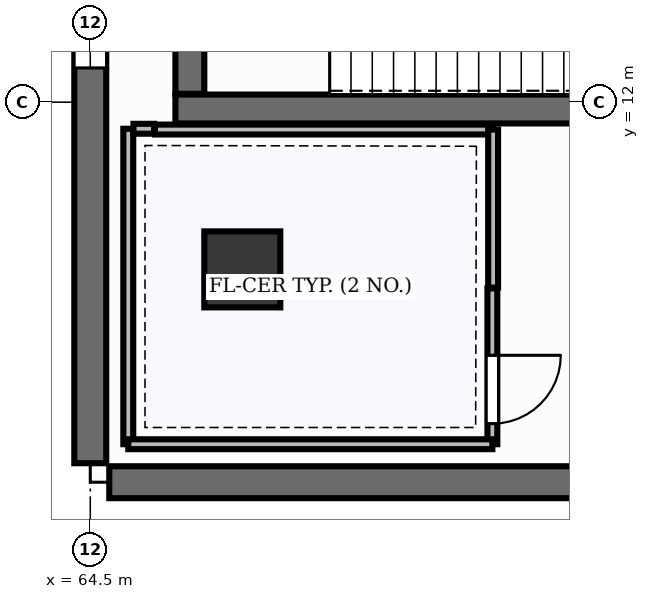
"""IFC4 building model, lengths in metres.
Left out: names, types, materials, properties, quantities, classifications, styles, units other than length and angle.
Written with IfcOpenShell. Run it as: python <this file> out.ifc"""

import sys

from ifc_helpers import new_model, si_unit, direction, frame, frame_2d, origin, origin_2d, place, context, subcontext, project, spatial, rectangle, extrude, element, fill, save


model = new_model("IFC4")
c1 = context("Model", 3, precision=1e-05, world=origin(), true_north=direction((0.0, 1.0)))
c2 = subcontext(c1, "Body", "Model", "MODEL_VIEW")
j1 = project(units=[si_unit("LENGTHUNIT", "METRE"), si_unit("PLANEANGLEUNIT", "RADIAN")], contexts=[c1])
p1 = place(None, origin())
s1 = spatial("IfcSite", under=j1, at=p1, CompositionType="ELEMENT")
p2 = place(p1, origin())
s2 = spatial("IfcBuilding", under=s1, at=p2, CompositionType="ELEMENT")
p3 = place(p2, frame((0.0, 0.0, 10.2)))
s3 = spatial("IfcBuildingStorey", under=s2, at=p3, CompositionType="ELEMENT", Elevation=10.2)
p4 = place(p3, frame((66.5, 9.8, 0.0), z_axis=(0.0, 0.0, 1.0), x_axis=(1.0, 0.0, 0.0)))
e1 = element("IfcColumn", 1, at=p4, inside=s3, PredefinedType="COLUMN", context=c2, shape_type="SweptSolid", body=[
    extrude(rectangle(XDim=1.0, YDim=1.0, at=origin_2d()), origin(), (0.0, 0.0, 1.0), 4.5),
])
p5 = place(p3, frame((64.5, 7.25, 0.0), z_axis=(0.0, 0.0, 1.0), x_axis=(0.0, 1.0, 0.0)))
e2 = element("IfcWall", 2, at=p5, inside=s3, PredefinedType="SHEAR", context=c2, shape_type="SweptSolid", body=[
    extrude(rectangle(XDim=39.5, YDim=0.42, at=frame_2d((19.75, 0.0))), origin(), (0.0, 0.0, 1.0), 4.5),
])
p6 = place(p5, frame((5.2, 0.0, 0.9)))
e3 = element("IfcOpeningElement", 3, at=p6, cuts=e2, PredefinedType="OPENING", context=c2, shape_type="SweptSolid", body=[
    extrude(rectangle(XDim=1.2, YDim=2.7, at=frame_2d((0.6, 1.35))), frame((0.0, 0.225, 0.0), z_axis=(0.0, -1.0, 0.0), x_axis=(1.0, 0.0, 0.0)), (0.0, 0.0, 1.0), 0.45),
])
p7 = place(p5, frame((12.2, 0.0, 0.9)))
e4 = element("IfcOpeningElement", 4, at=p7, cuts=e2, PredefinedType="OPENING", context=c2, shape_type="SweptSolid", body=[
    extrude(rectangle(XDim=1.2, YDim=2.7, at=frame_2d((0.6, 1.35))), frame((0.0, 0.225, 0.0), z_axis=(0.0, -1.0, 0.0), x_axis=(1.0, 0.0, 0.0)), (0.0, 0.0, 1.0), 0.45),
])
p8 = place(p5, frame((25.0, 0.0, 0.9)))
e5 = element("IfcOpeningElement", 5, at=p8, cuts=e2, PredefinedType="OPENING", context=c2, shape_type="SweptSolid", body=[
    extrude(rectangle(XDim=1.2, YDim=2.7, at=frame_2d((0.6, 1.35))), frame((0.0, 0.225, 0.0), z_axis=(0.0, -1.0, 0.0), x_axis=(1.0, 0.0, 0.0)), (0.0, 0.0, 1.0), 0.45),
])
p9 = place(p5, frame((31.8, 0.0, 0.9)))
e6 = element("IfcOpeningElement", 6, at=p9, cuts=e2, PredefinedType="OPENING", context=c2, shape_type="SweptSolid", body=[
    extrude(rectangle(XDim=1.2, YDim=2.7, at=frame_2d((0.6, 1.35))), frame((0.0, 0.225, 0.0), z_axis=(0.0, -1.0, 0.0), x_axis=(1.0, 0.0, 0.0)), (0.0, 0.0, 1.0), 0.45),
])
p10 = place(p3, frame((94.25, 7.0, 0.0), z_axis=(0.0, 0.0, 1.0), x_axis=(-1.0, 0.0, 0.0)))
e7 = element("IfcWall", 7, at=p10, inside=s3, PredefinedType="SHEAR", context=c2, shape_type="SweptSolid", body=[
    extrude(rectangle(XDim=29.5, YDim=0.42, at=frame_2d((14.75, 0.0))), origin(), (0.0, 0.0, 1.0), 4.5),
])
p11 = place(p3, frame((65.62, 11.91, 0.0), z_axis=(0.0, 0.0, 1.0), x_axis=(1.0, 0.0, 0.0)))
e8 = element("IfcWall", 8, at=p11, inside=s3, PredefinedType="SHEAR", context=c2, shape_type="SweptSolid", body=[
    extrude(rectangle(XDim=8.61, YDim=0.38, at=frame_2d((4.305, 0.0))), origin(), (0.0, 0.0, 1.0), 4.5),
])
p12 = place(p3, frame((65.81, 12.11, 0.0), z_axis=(0.0, 0.0, 1.0), x_axis=(0.0, 1.0, 0.0)))
e9 = element("IfcWall", 9, at=p12, inside=s3, PredefinedType="SHEAR", context=c2, shape_type="SweptSolid", body=[
    extrude(rectangle(XDim=3.48, YDim=0.38, at=frame_2d((1.74, 0.0))), origin(), (0.0, 0.0, 1.0), 4.5),
])
p13 = place(p3, frame((69.79, 9.55, 0.0), z_axis=(0.0, 0.0, 1.0), x_axis=(0.0, -1.0, 0.0)))
e10 = element("IfcWall", 10, at=p13, inside=s3, PredefinedType="PARTITIONING", context=c2, shape_type="SweptSolid", body=[
    extrude(rectangle(XDim=2.05, YDim=0.13, at=frame_2d((1.025, 0.0))), origin(), (0.0, 0.0, 1.0), 3.46),
])
p14 = place(p13, frame((0.88, 0.0, 0.0)))
e11 = element("IfcOpeningElement", 11, at=p14, cuts=e10, PredefinedType="OPENING", context=c2, shape_type="SweptSolid", body=[
    extrude(rectangle(XDim=0.9, YDim=2.15, at=frame_2d((0.45, 1.075))), frame((0.0, 0.08, 0.0), z_axis=(0.0, -1.0, 0.0), x_axis=(1.0, 0.0, 0.0)), (0.0, 0.0, 1.0), 0.16),
])
p15 = place(p3, frame((65.0, 7.5, 0.0), z_axis=(0.0, 0.0, 1.0), x_axis=(0.0, 1.0, 0.0)))
e12 = element("IfcWall", 12, at=p15, inside=s3, PredefinedType="PARTITIONING", context=c2, shape_type="SweptSolid", body=[
    extrude(rectangle(XDim=4.15, YDim=0.13, at=frame_2d((2.075, 0.0))), origin(), (0.0, 0.0, 1.0), 3.46),
])
p16 = place(p3, frame((65.068, 11.65, 0.0), z_axis=(0.0, 0.0, 1.0), x_axis=(1.0, 0.0, 0.0)))
e13 = element("IfcWall", 13, at=p16, inside=s3, PredefinedType="PARTITIONING", context=c2, shape_type="SweptSolid", body=[
    extrude(rectangle(XDim=0.272, YDim=0.13, at=frame_2d((0.136, 0.0))), origin(), (0.0, 0.0, 1.0), 3.46),
])
p17 = place(p3, frame((65.35, 11.64, 0.0), z_axis=(0.0, 0.0, 1.0), x_axis=(1.0, 0.0, 0.0)))
e14 = element("IfcWall", 14, at=p17, inside=s3, PredefinedType="PARTITIONING", context=c2, shape_type="SweptSolid", body=[
    extrude(rectangle(XDim=4.45, YDim=0.13, at=frame_2d((2.225, 0.0))), origin(), (0.0, 0.0, 1.0), 3.46),
])
p18 = place(p3, frame((69.8, 11.64, 0.0), z_axis=(0.0, 0.0, 1.0), x_axis=(0.0, -1.0, 0.0)))
e15 = element("IfcWall", 15, at=p18, inside=s3, PredefinedType="PARTITIONING", context=c2, shape_type="SweptSolid", body=[
    extrude(rectangle(XDim=2.08, YDim=0.13, at=frame_2d((1.04, 0.0))), origin(), (0.0, 0.0, 1.0), 3.46),
])
p19 = place(p3, frame((69.79, 7.5, 0.0), z_axis=(0.0, 0.0, 1.0), x_axis=(-1.0, 0.0, 0.0)))
e16 = element("IfcWall", 16, at=p19, inside=s3, PredefinedType="PARTITIONING", context=c2, shape_type="SweptSolid", body=[
    extrude(rectangle(XDim=4.79, YDim=0.13, at=frame_2d((2.395, 0.0))), origin(), (0.0, 0.0, 1.0), 3.46),
])
p20 = place(p6, origin())
e17 = element("IfcWindow", 17, at=p20, inside=s3, PartitioningType="SINGLE_PANEL", PredefinedType="WINDOW", context=c2, shape_type="SweptSolid", body=[
    extrude(rectangle(XDim=1.2, YDim=2.7, at=frame_2d((0.6, 1.35))), frame((0.0, 0.03, 0.0), z_axis=(0.0, -1.0, 0.0), x_axis=(1.0, 0.0, 0.0)), (0.0, 0.0, 1.0), 0.06),
])
fill(e3, e17)
p21 = place(p14, origin())
e18 = element("IfcDoor", 18, at=p21, inside=s3, OperationType="SINGLE_SWING_LEFT", PredefinedType="DOOR", context=c2, shape_type="SweptSolid", body=[
    extrude(rectangle(XDim=0.9, YDim=2.15, at=frame_2d((0.45, 1.075))), frame((0.0, 0.025, 0.0), z_axis=(0.0, -1.0, 0.0), x_axis=(1.0, 0.0, 0.0)), (0.0, 0.0, 1.0), 0.05),
])
fill(e11, e18)
save(model, sys.argv[1])
